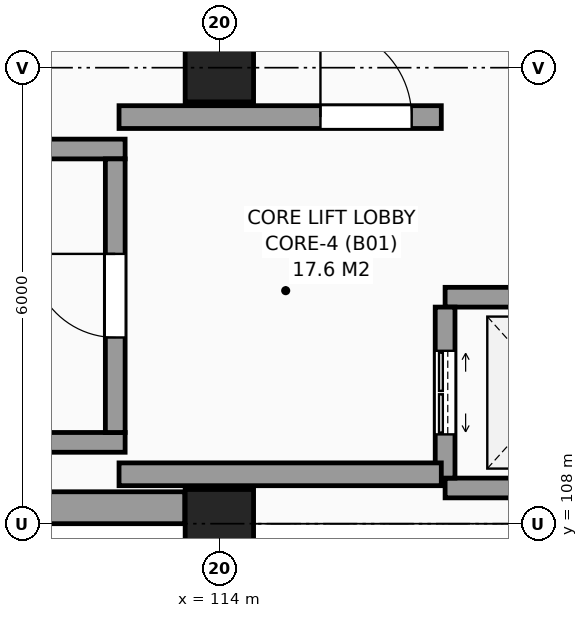
"""IFC4 building model, lengths in metres.
Left out: names, types, materials, properties, quantities, classifications, styles, units other than length and angle.
Written with IfcOpenShell. Run it as: python <this file> out.ifc"""

import sys

from ifc_helpers import new_model, si_unit, direction, frame, frame_2d, origin, origin_2d, place, context, subcontext, project, spatial, rectangle, extrude, element, fill, save


model = new_model("IFC4")
c1 = context("Model", 3, precision=1e-05, world=origin(), true_north=direction((0.0, 1.0)))
c2 = subcontext(c1, "Body", "Model", "MODEL_VIEW")
j1 = project(units=[si_unit("LENGTHUNIT", "METRE"), si_unit("PLANEANGLEUNIT", "RADIAN")], contexts=[c1])
p1 = place(None, origin())
s1 = spatial("IfcSite", under=j1, at=p1, CompositionType="ELEMENT")
p2 = place(p1, origin())
s2 = spatial("IfcBuilding", under=s1, at=p2, CompositionType="ELEMENT")
p3 = place(p2, frame((0.0, 0.0, -4.8)))
s3 = spatial("IfcBuildingStorey", under=s2, at=p3, CompositionType="ELEMENT", Elevation=-4.8)
for number, where, z_axis, x_axis in (
    (1, (114.0, 108.0, 0.0), (0.0, 0.0, 1.0), (1.0, 0.0, 0.0)),
    (2, (114.0, 114.0, 0.0), (0.0, 0.0, 1.0), (1.0, 0.0, 0.0)),
):
    element("IfcColumn", number, at=place(p3, frame(where, z_axis=z_axis, x_axis=x_axis)), inside=s3, PredefinedType="COLUMN", context=c2, shape_type="SweptSolid", body=[
        extrude(rectangle(XDim=0.9, YDim=0.9, at=origin_2d()), origin(), (0.0, 0.0, 1.0), 4.8),
    ])
p4 = place(p3, frame((108.455, 108.21, 0.0), z_axis=(0.0, 0.0, 1.0), x_axis=(1.0, 0.0, 0.0)))
e3 = element("IfcWall", 3, at=p4, inside=s3, PredefinedType="SOLIDWALL", context=c2, shape_type="SweptSolid", body=[
    extrude(rectangle(XDim=5.09, YDim=0.42, at=frame_2d((2.545, 0.0))), origin(), (0.0, 0.0, 1.0), 3.75),
])
for number, where, z_axis, x_axis in (
    (4, (102.04, 109.07, -0.5), (0.0, 0.0, 1.0), (1.0, 0.0, 0.0)),
    (5, (102.04, 112.93, -0.5), (0.0, 0.0, 1.0), (1.0, 0.0, 0.0)),
):
    element("IfcWall", number, at=place(p3, frame(where, z_axis=z_axis, x_axis=x_axis)), inside=s3, PredefinedType="SHEAR", context=c2, shape_type="SweptSolid", body=[
        extrude(rectangle(XDim=10.72, YDim=0.26, at=frame_2d((5.36, 0.0))), origin(), (0.0, 0.0, 1.0), 5.3),
    ])
p5 = place(p3, frame((112.63, 109.2, -0.5), z_axis=(0.0, 0.0, 1.0), x_axis=(0.0, 1.0, 0.0)))
e6 = element("IfcWall", 6, at=p5, inside=s3, PredefinedType="SHEAR", context=c2, shape_type="SweptSolid", body=[
    extrude(rectangle(XDim=3.6, YDim=0.26, at=frame_2d((1.8, 0.0))), origin(), (0.0, 0.0, 1.0), 5.3),
])
p6 = place(p5, frame((1.25, 0.0, 0.5)))
e7 = element("IfcOpeningElement", 7, at=p6, cuts=e6, PredefinedType="OPENING", context=c2, shape_type="SweptSolid", body=[
    extrude(rectangle(XDim=1.1, YDim=2.15, at=frame_2d((0.55, 1.075))), frame((0.0, 0.14, 0.0), z_axis=(0.0, -1.0, 0.0), x_axis=(1.0, 0.0, 0.0)), (0.0, 0.0, 1.0), 0.28),
])
for number, where, z_axis, x_axis in (
    (8, (116.97, 108.47, -0.5), (0.0, 0.0, 1.0), (1.0, 0.0, 0.0)),
    (9, (116.97, 110.98, -0.5), (0.0, 0.0, 1.0), (1.0, 0.0, 0.0)),
):
    element("IfcWall", number, at=place(p3, frame(where, z_axis=z_axis, x_axis=x_axis)), inside=s3, PredefinedType="SHEAR", context=c2, shape_type="SweptSolid", body=[
        extrude(rectangle(XDim=2.91, YDim=0.26, at=frame_2d((1.455, 0.0))), origin(), (0.0, 0.0, 1.0), 5.3),
    ])
p7 = place(p3, frame((116.97, 108.6, -0.5), z_axis=(0.0, 0.0, 1.0), x_axis=(0.0, 1.0, 0.0)))
e10 = element("IfcWall", 10, at=p7, inside=s3, PredefinedType="SHEAR", context=c2, shape_type="SweptSolid", body=[
    extrude(rectangle(XDim=2.25, YDim=0.26, at=frame_2d((1.125, 0.0))), origin(), (0.0, 0.0, 1.0), 5.3),
])
p8 = place(p7, frame((0.575, 0.0, 0.5)))
e11 = element("IfcOpeningElement", 11, at=p8, cuts=e10, PredefinedType="OPENING", context=c2, shape_type="SweptSolid", body=[
    extrude(rectangle(XDim=1.1, YDim=2.2, at=frame_2d((0.55, 1.1))), frame((0.0, 0.14, 0.0), z_axis=(0.0, -1.0, 0.0), x_axis=(1.0, 0.0, 0.0)), (0.0, 0.0, 1.0), 0.28),
])
p9 = place(p3, frame((112.68, 113.35, -0.5), z_axis=(0.0, 0.0, 1.0), x_axis=(1.0, 0.0, 0.0)))
e12 = element("IfcWall", 12, at=p9, inside=s3, PredefinedType="SHEAR", context=c2, shape_type="SweptSolid", body=[
    extrude(rectangle(XDim=4.24, YDim=0.3, at=frame_2d((2.12, 0.0))), origin(), (0.0, 0.0, 1.0), 5.3),
])
p10 = place(p9, frame((2.65, 0.0, 0.5)))
e13 = element("IfcOpeningElement", 13, at=p10, cuts=e12, PredefinedType="OPENING", context=c2, shape_type="SweptSolid", body=[
    extrude(rectangle(XDim=1.2, YDim=2.2, at=frame_2d((0.6, 1.1))), frame((0.0, 0.16, 0.0), z_axis=(0.0, -1.0, 0.0), x_axis=(1.0, 0.0, 0.0)), (0.0, 0.0, 1.0), 0.32),
])
p11 = place(p3, frame((112.68, 108.65, -0.5), z_axis=(0.0, 0.0, 1.0), x_axis=(1.0, 0.0, 0.0)))
e14 = element("IfcWall", 14, at=p11, inside=s3, PredefinedType="SHEAR", context=c2, shape_type="SweptSolid", body=[
    extrude(rectangle(XDim=4.24, YDim=0.3, at=frame_2d((2.12, 0.0))), origin(), (0.0, 0.0, 1.0), 5.3),
])
p12 = place(p6, origin())
e15 = element("IfcDoor", 15, at=p12, inside=s3, OperationType="SINGLE_SWING_RIGHT", PredefinedType="DOOR", context=c2, shape_type="SweptSolid", body=[
    extrude(rectangle(XDim=1.1, YDim=2.15, at=frame_2d((0.55, 1.075))), frame((0.0, 0.025, 0.0), z_axis=(0.0, -1.0, 0.0), x_axis=(1.0, 0.0, 0.0)), (0.0, 0.0, 1.0), 0.05),
])
fill(e7, e15)
p13 = place(p8, origin())
e16 = element("IfcDoor", 16, at=p13, inside=s3, OperationType="DOUBLE_DOOR_SLIDING", PredefinedType="DOOR", context=c2, shape_type="SweptSolid", body=[
    extrude(rectangle(XDim=1.1, YDim=2.2, at=frame_2d((0.55, 1.1))), frame((0.0, 0.025, 0.0), z_axis=(0.0, -1.0, 0.0), x_axis=(1.0, 0.0, 0.0)), (0.0, 0.0, 1.0), 0.05),
])
fill(e11, e16)
p14 = place(p10, origin())
e17 = element("IfcDoor", 17, at=p14, inside=s3, OperationType="SINGLE_SWING_LEFT", PredefinedType="DOOR", context=c2, shape_type="SweptSolid", body=[
    extrude(rectangle(XDim=1.2, YDim=2.2, at=frame_2d((0.6, 1.1))), frame((0.0, 0.025, 0.0), z_axis=(0.0, -1.0, 0.0), x_axis=(1.0, 0.0, 0.0)), (0.0, 0.0, 1.0), 0.05),
])
fill(e13, e17)
save(model, sys.argv[1])
